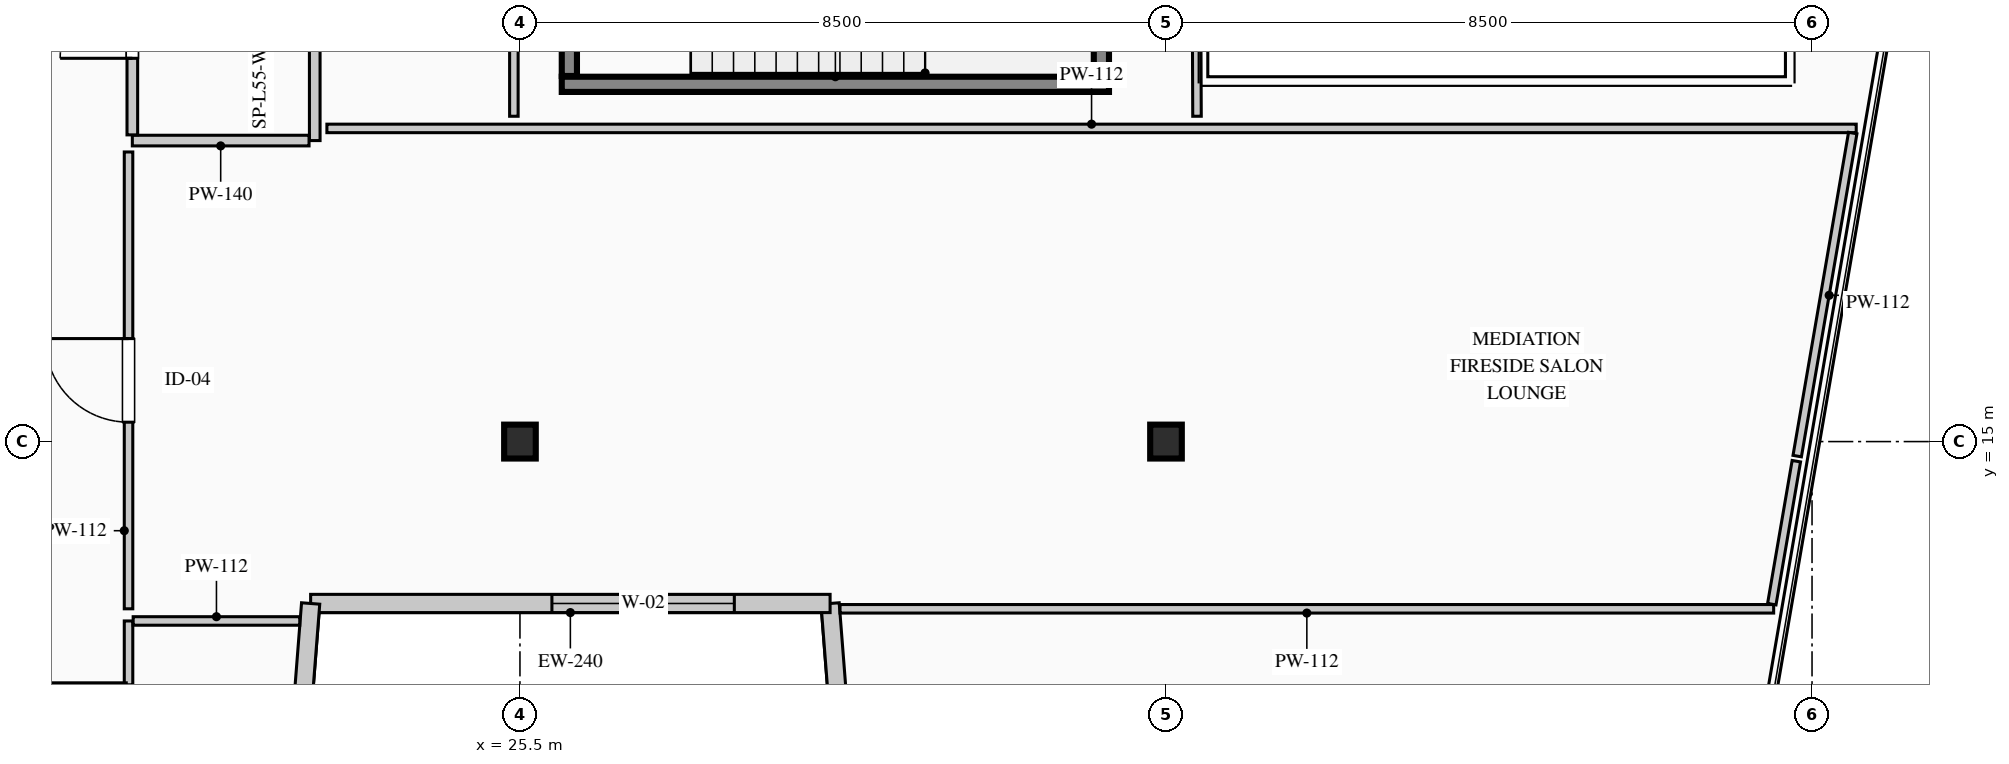
"""IFC4 building model, lengths in metres.
Left out: names, types, materials, properties, quantities, classifications, styles, units other than length and angle.
Written with IfcOpenShell. Run it as: python <this file> out.ifc"""

import sys

from ifc_helpers import new_model, si_unit, direction, frame, frame_2d, origin, origin_2d, place, context, subcontext, project, spatial, rectangle, i_section, extrude, element, fill, save


model = new_model("IFC4")
c1 = context("Model", 3, precision=1e-05, world=origin(), true_north=direction((0.0, 1.0)))
c2 = subcontext(c1, "Body", "Model", "MODEL_VIEW")
j1 = project(units=[si_unit("LENGTHUNIT", "METRE"), si_unit("PLANEANGLEUNIT", "RADIAN")], contexts=[c1])
p1 = place(None, origin())
s1 = spatial("IfcSite", under=j1, at=p1, CompositionType="ELEMENT")
p2 = place(p1, origin())
s2 = spatial("IfcBuilding", under=s1, at=p2, CompositionType="ELEMENT")
p3 = place(p2, frame((0.0, 0.0, 231.15)))
s3 = spatial("IfcBuildingStorey", under=s2, at=p3, CompositionType="ELEMENT", Elevation=231.15)
p4 = place(p3, frame((26.05, 19.7, 0.0), z_axis=(0.0, 0.0, 1.0), x_axis=(1.0, 0.0, 0.0)))
e1 = element("IfcWall", 1, at=p4, inside=s3, PredefinedType="SHEAR", context=c2, shape_type="SweptSolid", body=[
    extrude(rectangle(XDim=7.2, YDim=0.2, at=frame_2d((3.6, 0.0))), origin(), (0.0, 0.0, 1.0), 3.95),
])
for number, where, z_axis, x_axis in (
    (2, (26.15, 19.81, 0.0), (0.0, 0.0, 1.0), (0.0, 1.0, 0.0)),
    (3, (33.15, 19.81, 0.0), (0.0, 0.0, 1.0), (0.0, 1.0, 0.0)),
):
    element("IfcWall", number, at=place(p3, frame(where, z_axis=z_axis, x_axis=x_axis)), inside=s3, PredefinedType="SHEAR", context=c2, shape_type="SweptSolid", body=[
        extrude(rectangle(XDim=3.13, YDim=0.2, at=frame_2d((1.565, 0.0))), origin(), (0.0, 0.0, 1.0), 3.95),
    ])
for number, where, z_axis, x_axis in (
    (4, (25.5, 15.0, 0.0), (0.0, 0.0, 1.0), (1.0, 0.0, 0.0)),
    (5, (34.0, 15.0, 0.0), (0.0, 0.0, 1.0), (1.0, 0.0, 0.0)),
):
    element("IfcColumn", number, at=place(p3, frame(where, z_axis=z_axis, x_axis=x_axis)), inside=s3, PredefinedType="COLUMN", context=c2, shape_type="SweptSolid", body=[
        extrude(i_section(OverallWidth=0.416, OverallDepth=0.446, WebThickness=0.039, FlangeThickness=0.063, FilletRadius=0.015, at=origin_2d()), origin(), (0.0, 0.0, 1.0), 3.95),
    ])
p5 = place(p3, frame((30.381, 2.62, 0.0), z_axis=(0.0, 0.0, 1.0), x_axis=(-0.077816860153, 0.996967670627, 0.0)))
e6 = element("IfcWall", 6, at=p5, inside=s3, PredefinedType="STANDARD", context=c2, shape_type="SweptSolid", body=[
    extrude(rectangle(XDim=10.281, YDim=0.24, at=frame_2d((5.141, 0.0))), origin(), (0.0, 0.0, 1.0), 3.7),
])
p6 = place(p5, frame((5.38, 0.0, 0.9)))
e7 = element("IfcOpeningElement", 7, at=p6, cuts=e6, PredefinedType="OPENING", context=c2, shape_type="SweptSolid", body=[
    extrude(rectangle(XDim=2.4, YDim=2.1, at=frame_2d((1.2, 1.05))), frame((0.0, 0.13, 0.0), z_axis=(0.0, -1.0, 0.0), x_axis=(1.0, 0.0, 0.0)), (0.0, 0.0, 1.0), 0.26),
])
p7 = place(p3, frame((29.581, 12.87, 0.0), z_axis=(0.0, 0.0, 1.0), x_axis=(-1.0, 0.0, 0.0)))
e8 = element("IfcWall", 8, at=p7, inside=s3, PredefinedType="STANDARD", context=c2, shape_type="SweptSolid", body=[
    extrude(rectangle(XDim=6.834, YDim=0.24, at=frame_2d((3.417, 0.0))), origin(), (0.0, 0.0, 1.0), 3.7),
])
p8 = place(p7, frame((1.26, 0.0, 0.9)))
e9 = element("IfcOpeningElement", 9, at=p8, cuts=e8, PredefinedType="OPENING", context=c2, shape_type="SweptSolid", body=[
    extrude(rectangle(XDim=2.4, YDim=2.1, at=frame_2d((1.2, 1.05))), frame((0.0, 0.13, 0.0), z_axis=(0.0, -1.0, 0.0), x_axis=(1.0, 0.0, 0.0)), (0.0, 0.0, 1.0), 0.26),
])
p9 = place(p3, frame((22.746, 12.87, 0.0), z_axis=(0.0, 0.0, 1.0), x_axis=(-0.077816860153, -0.996967670627, 0.0)))
e10 = element("IfcWall", 10, at=p9, inside=s3, PredefinedType="STANDARD", context=c2, shape_type="SweptSolid", body=[
    extrude(rectangle(XDim=10.281, YDim=0.24, at=frame_2d((5.141, 0.0))), origin(), (0.0, 0.0, 1.0), 3.7),
])
p10 = place(p9, frame((2.501, 0.0, 0.9)))
e11 = element("IfcOpeningElement", 11, at=p10, cuts=e10, PredefinedType="OPENING", context=c2, shape_type="SweptSolid", body=[
    extrude(rectangle(XDim=2.4, YDim=2.1, at=frame_2d((1.2, 1.05))), frame((0.0, 0.13, 0.0), z_axis=(0.0, -1.0, 0.0), x_axis=(1.0, 0.0, 0.0)), (0.0, 0.0, 1.0), 0.26),
])
p11 = place(p3, frame((22.8, 22.0, 0.0), z_axis=(0.0, 0.0, 1.0), x_axis=(0.0, -1.0, 0.0)))
e12 = element("IfcWall", 12, at=p11, inside=s3, PredefinedType="PARTITIONING", context=c2, shape_type="SweptSolid", body=[
    extrude(rectangle(XDim=3.04, YDim=0.14, at=frame_2d((1.52, 0.0))), origin(), (0.0, 0.0, 1.0), 3.285),
])
p12 = place(p3, frame((22.725, 18.96, 0.0), z_axis=(0.0, 0.0, 1.0), x_axis=(-1.0, 0.0, 0.0)))
e13 = element("IfcWall", 13, at=p12, inside=s3, PredefinedType="PARTITIONING", context=c2, shape_type="SweptSolid", body=[
    extrude(rectangle(XDim=2.325, YDim=0.14, at=frame_2d((1.163, 0.0))), origin(), (0.0, 0.0, 1.0), 3.7),
])
p13 = place(p3, frame((20.4, 19.035, 0.0), z_axis=(0.0, 0.0, 1.0), x_axis=(0.0, 1.0, 0.0)))
e14 = element("IfcWall", 14, at=p13, inside=s3, PredefinedType="PARTITIONING", context=c2, shape_type="SweptSolid", body=[
    extrude(rectangle(XDim=2.965, YDim=0.14, at=frame_2d((1.482, 0.0))), origin(), (0.0, 0.0, 1.0), 3.7),
])
p14 = place(p13, frame((1.008, 0.0, 0.0)))
e15 = element("IfcOpeningElement", 15, at=p14, cuts=e14, PredefinedType="OPENING", context=c2, shape_type="SweptSolid", body=[
    extrude(rectangle(XDim=0.95, YDim=2.15, at=frame_2d((0.475, 1.075))), frame((0.0, 0.08, 0.0), z_axis=(0.0, -1.0, 0.0), x_axis=(1.0, 0.0, 0.0)), (0.0, 0.0, 1.0), 0.16),
])
p15 = place(p3, frame((20.35, 11.8, 0.0), z_axis=(0.0, 0.0, 1.0), x_axis=(0.0, 1.0, 0.0)))
e16 = element("IfcWall", 16, at=p15, inside=s3, PredefinedType="PARTITIONING", context=c2, shape_type="SweptSolid", body=[
    extrude(rectangle(XDim=0.84, YDim=0.112, at=frame_2d((0.42, 0.0))), origin(), (0.0, 0.0, 1.0), 3.7),
])
p16 = place(p3, frame((20.411, 12.64, 0.0), z_axis=(0.0, 0.0, 1.0), x_axis=(1.0, 0.0, 0.0)))
e17 = element("IfcWall", 17, at=p16, inside=s3, PredefinedType="PARTITIONING", context=c2, shape_type="SweptSolid", body=[
    extrude(rectangle(XDim=2.192, YDim=0.112, at=frame_2d((1.096, 0.0))), origin(), (0.0, 0.0, 1.0), 3.7),
])
p17 = place(p3, frame((17.08, 11.77, 0.0), z_axis=(0.0, 0.0, 1.0), x_axis=(1.0, 0.0, 0.0)))
e18 = element("IfcWall", 18, at=p17, inside=s3, PredefinedType="PARTITIONING", context=c2, shape_type="SweptSolid", body=[
    extrude(rectangle(XDim=3.24, YDim=0.112, at=frame_2d((1.62, 0.0))), origin(), (0.0, 0.0, 1.0), 3.7),
])
p18 = place(p17, frame((1.07, 0.0, 0.0)))
e19 = element("IfcOpeningElement", 19, at=p18, cuts=e18, PredefinedType="OPENING", context=c2, shape_type="SweptSolid", body=[
    extrude(rectangle(XDim=1.1, YDim=2.2, at=frame_2d((0.55, 1.1))), frame((0.0, 0.066, 0.0), z_axis=(0.0, -1.0, 0.0), x_axis=(1.0, 0.0, 0.0)), (0.0, 0.0, 1.0), 0.132),
])
p19 = place(p3, frame((41.995, 12.8, 0.0), z_axis=(0.0, 0.0, 1.0), x_axis=(-1.0, 0.0, 0.0)))
e20 = element("IfcWall", 20, at=p19, inside=s3, PredefinedType="PARTITIONING", context=c2, shape_type="SweptSolid", body=[
    extrude(rectangle(XDim=12.284, YDim=0.112, at=frame_2d((6.142, 0.0))), origin(), (0.0, 0.0, 1.0), 3.7),
])
p20 = place(p3, frame((20.35, 12.8, 0.0), z_axis=(0.0, 0.0, 1.0), x_axis=(0.0, 1.0, 0.0)))
e21 = element("IfcWall", 21, at=p20, inside=s3, PredefinedType="PARTITIONING", context=c2, shape_type="SweptSolid", body=[
    extrude(rectangle(XDim=6.01, YDim=0.112, at=frame_2d((3.005, 0.0))), origin(), (0.0, 0.0, 1.0), 3.7),
])
p21 = place(p20, frame((2.455, 0.0, 0.0)))
e22 = element("IfcOpeningElement", 22, at=p21, cuts=e21, PredefinedType="OPENING", context=c2, shape_type="SweptSolid", body=[
    extrude(rectangle(XDim=1.1, YDim=2.2, at=frame_2d((0.55, 1.1))), frame((0.0, 0.066, 0.0), z_axis=(0.0, -1.0, 0.0), x_axis=(1.0, 0.0, 0.0)), (0.0, 0.0, 1.0), 0.132),
])
p22 = place(p3, frame((22.96, 19.12, 0.0), z_axis=(0.0, 0.0, 1.0), x_axis=(1.0, 0.0, 0.0)))
e23 = element("IfcWall", 23, at=p22, inside=s3, PredefinedType="PARTITIONING", context=c2, shape_type="SweptSolid", body=[
    extrude(rectangle(XDim=20.121, YDim=0.112, at=frame_2d((10.061, 0.0))), origin(), (0.0, 0.0, 1.0), 3.7),
])
p23 = place(p3, frame((43.035, 19.059, 0.0), z_axis=(0.0, 0.0, 1.0), x_axis=(-0.169391215599, -0.98554889076, 0.0)))
e24 = element("IfcWall", 24, at=p23, inside=s3, PredefinedType="PARTITIONING", context=c2, shape_type="SweptSolid", body=[
    extrude(rectangle(XDim=4.312, YDim=0.112, at=frame_2d((2.156, 0.0))), origin(), (0.0, 0.0, 1.0), 3.7),
])
p24 = place(p3, frame((42.293, 14.742, 0.0), z_axis=(0.0, 0.0, 1.0), x_axis=(-0.169251422206, -0.985572907542, 0.0)))
e25 = element("IfcWall", 25, at=p24, inside=s3, PredefinedType="PARTITIONING", context=c2, shape_type="SweptSolid", body=[
    extrude(rectangle(XDim=1.908, YDim=0.112, at=frame_2d((0.954, 0.0))), origin(), (0.0, 0.0, 1.0), 3.7),
])
p25 = place(p3, frame((25.42, 29.02, 0.0), z_axis=(0.0, 0.0, 1.0), x_axis=(0.0, -1.0, 0.0)))
e26 = element("IfcWall", 26, at=p25, inside=s3, PredefinedType="PARTITIONING", context=c2, shape_type="SweptSolid", body=[
    extrude(rectangle(XDim=9.74, YDim=0.112, at=frame_2d((4.87, 0.0))), origin(), (0.0, 0.0, 1.0), 2.885),
])
p26 = place(p3, frame((34.37, 28.6, 0.0), z_axis=(0.0, 0.0, 1.0), x_axis=(0.004060215387, -0.999991757292, 0.0)))
e27 = element("IfcWall", 27, at=p26, inside=s3, PredefinedType="PARTITIONING", context=c2, shape_type="SweptSolid", body=[
    extrude(rectangle(XDim=9.32, YDim=0.112, at=frame_2d((4.66, 0.0))), origin(), (0.0, 0.0, 1.0), 3.7),
])
p27 = place(p8, origin())
e28 = element("IfcWindow", 28, at=p27, inside=s3, PartitioningType="DOUBLE_PANEL_VERTICAL", PredefinedType="WINDOW", context=c2, shape_type="SweptSolid", body=[
    extrude(rectangle(XDim=2.4, YDim=2.1, at=frame_2d((1.2, 1.05))), frame((0.0, 0.03, 0.0), z_axis=(0.0, -1.0, 0.0), x_axis=(1.0, 0.0, 0.0)), (0.0, 0.0, 1.0), 0.06),
])
fill(e9, e28)
p28 = place(p14, origin())
e29 = element("IfcDoor", 29, at=p28, inside=s3, OperationType="SINGLE_SWING_LEFT", PredefinedType="DOOR", context=c2, shape_type="SweptSolid", body=[
    extrude(rectangle(XDim=0.95, YDim=2.15, at=frame_2d((0.475, 1.075))), frame((0.0, 0.025, 0.0), z_axis=(0.0, -1.0, 0.0), x_axis=(1.0, 0.0, 0.0)), (0.0, 0.0, 1.0), 0.05),
])
fill(e15, e29)
p29 = place(p21, origin())
e30 = element("IfcDoor", 30, at=p29, inside=s3, OperationType="SINGLE_SWING_RIGHT", PredefinedType="DOOR", context=c2, shape_type="SweptSolid", body=[
    extrude(rectangle(XDim=1.1, YDim=2.2, at=frame_2d((0.55, 1.1))), frame((0.0, 0.025, 0.0), z_axis=(0.0, -1.0, 0.0), x_axis=(1.0, 0.0, 0.0)), (0.0, 0.0, 1.0), 0.05),
])
fill(e22, e30)
save(model, sys.argv[1])
